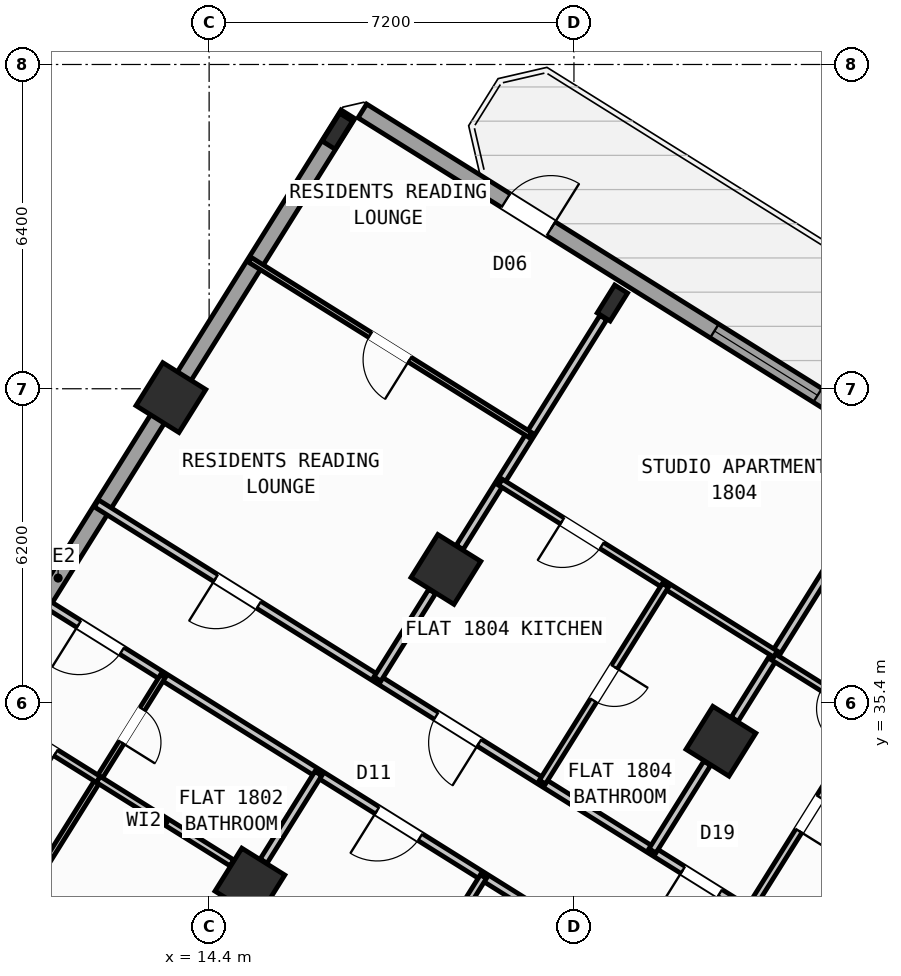
"""IFC4 building model, lengths in metres.
Left out: names, types, materials, properties, quantities, classifications, styles, units other than length and angle.
Written with IfcOpenShell. Run it as: python <this file> out.ifc"""

import sys

from ifc_helpers import new_model, si_unit, direction, frame, frame_2d, origin, origin_2d, place, context, subcontext, project, spatial, rectangle, hollow_rectangle, i_section, extrude, source, transform, mapped, element, fill, save


model = new_model("IFC4")
c1 = context("Model", 3, precision=1e-05, world=origin(), true_north=direction((0.0, 1.0)))
c2 = subcontext(c1, "Body", "Model", "MODEL_VIEW")
j1 = project(units=[si_unit("LENGTHUNIT", "METRE"), si_unit("PLANEANGLEUNIT", "RADIAN")], contexts=[c1])
p1 = place(None, origin())
s1 = spatial("IfcSite", under=j1, at=p1, CompositionType="ELEMENT")
p2 = place(p1, origin())
s2 = spatial("IfcBuilding", under=s1, at=p2, CompositionType="ELEMENT")
p3 = place(p2, frame((0.0, 0.0, 71.7)))
s3 = spatial("IfcBuildingStorey", under=s2, at=p3, CompositionType="ELEMENT", Elevation=71.7)
m1 = source(origin(), c2, "Body", "SweptSolid", [
    extrude(hollow_rectangle(XDim=1.0, YDim=1.0, WallThickness=0.04, at=origin_2d()), origin(), (0.0, 0.0, 1.0), 4.8),
])
p4 = place(p3, frame((24.5, 34.643, 0.0), z_axis=(0.0, 0.0, 1.0), x_axis=(-0.848048096156, 0.529919264233, 0.0)))
e1 = element("IfcColumn", 1, at=p4, inside=s3, PredefinedType="COLUMN", context=c2, shape_type="MappedRepresentation", body=[
    mapped(m1, transform((0.0, 0.0, 0.0), scale=1.0)),
])
m2 = source(origin(), c2, "Body", "SweptSolid", [
    extrude(i_section(OverallWidth=0.3, OverallDepth=0.65, WebThickness=0.016, FlangeThickness=0.031, at=origin_2d()), origin(), (0.0, 0.0, 1.0), 4.8),
])
p5 = place(p3, frame((22.358, 43.292, 0.0), z_axis=(0.0, 0.0, 1.0), x_axis=(-0.848048096156, 0.529919264233, 0.0)))
e2 = element("IfcColumn", 2, at=p5, inside=s3, PredefinedType="COLUMN", context=c2, shape_type="MappedRepresentation", body=[
    mapped(m2, transform((0.0, 0.0, 0.0), scale=1.0)),
])
for number, where, z_axis, x_axis in (
    (3, (19.073, 38.034, 0.0), (0.0, 0.0, 1.0), (-0.848, 0.53, 0.0)),
    (4, (15.205, 31.844, 0.0), (0.0, 0.0, 1.0), (-0.848, 0.53, 0.0)),
):
    element("IfcColumn", number, at=place(p3, frame(where, z_axis=z_axis, x_axis=x_axis)), inside=s3, PredefinedType="COLUMN", context=c2, shape_type="MappedRepresentation", body=[
        mapped(m1, transform((0.0, 0.0, 0.0), scale=1.0)),
    ])
p6 = place(p3, frame((16.931, 46.684, 0.0), z_axis=(0.0, 0.0, 1.0), x_axis=(-0.848048096156, 0.529919264233, 0.0)))
e5 = element("IfcColumn", 5, at=p6, inside=s3, PredefinedType="COLUMN", context=c2, shape_type="MappedRepresentation", body=[
    mapped(m2, transform((0.0, 0.0, 0.0), scale=1.0)),
])
p7 = place(p3, frame((13.646, 41.426, 0.0), z_axis=(0.0, 0.0, 1.0), x_axis=(-0.848048096156, 0.529919264233, 0.0)))
e6 = element("IfcColumn", 6, at=p7, inside=s3, PredefinedType="COLUMN", context=c2, shape_type="MappedRepresentation", body=[
    mapped(m1, transform((0.0, 0.0, 0.0), scale=1.0)),
])
p8 = place(p3, frame((5.7, 28.71, 0.0), z_axis=(0.0, 0.0, 1.0), x_axis=(0.529923711467, 0.8480453172, 0.0)))
e7 = element("IfcWall", 7, at=p8, inside=s3, PredefinedType="STANDARD", context=c2, shape_type="SweptSolid", body=[
    extrude(rectangle(XDim=21.587, YDim=0.32, at=frame_2d((10.794, 0.0))), origin(), (0.0, 0.0, 1.0), 3.895),
])
p9 = place(p8, frame((2.844, 0.0, 0.75)))
e8 = element("IfcOpeningElement", 8, at=p9, cuts=e7, PredefinedType="OPENING", context=c2, shape_type="SweptSolid", body=[
    extrude(rectangle(XDim=2.4, YDim=1.6, at=frame_2d((1.2, 0.8))), frame((0.0, 0.17, 0.0), z_axis=(0.0, -1.0, 0.0), x_axis=(1.0, 0.0, 0.0)), (0.0, 0.0, 1.0), 0.34),
])
p10 = place(p3, frame((17.424, 47.083, 0.0), z_axis=(0.0, 0.0, 1.0), x_axis=(0.848049927979, -0.529916332693, 0.0)))
e9 = element("IfcWall", 9, at=p10, inside=s3, PredefinedType="STANDARD", context=c2, shape_type="SweptSolid", body=[
    extrude(rectangle(XDim=29.223, YDim=0.32, at=frame_2d((14.612, 0.0))), origin(), (0.0, 0.0, 1.0), 4.52),
])
p11 = place(p10, frame((3.339, 0.0, 0.0)))
e10 = element("IfcOpeningElement", 10, at=p11, cuts=e9, PredefinedType="OPENING", context=c2, shape_type="SweptSolid", body=[
    extrude(rectangle(XDim=1.05, YDim=2.15, at=frame_2d((0.525, 1.075))), frame((0.0, 0.17, 0.0), z_axis=(0.0, -1.0, 0.0), x_axis=(1.0, 0.0, 0.0)), (0.0, 0.0, 1.0), 0.34),
])
p12 = place(p10, frame((8.194, 0.0, 0.75)))
e11 = element("IfcOpeningElement", 11, at=p12, cuts=e9, PredefinedType="OPENING", context=c2, shape_type="SweptSolid", body=[
    extrude(rectangle(XDim=2.4, YDim=1.6, at=frame_2d((1.2, 0.8))), frame((0.0, 0.17, 0.0), z_axis=(0.0, -1.0, 0.0), x_axis=(1.0, 0.0, 0.0)), (0.0, 0.0, 1.0), 0.34),
])
p13 = place(p10, frame((22.226, 0.0, 0.85)))
e12 = element("IfcOpeningElement", 12, at=p13, cuts=e9, PredefinedType="OPENING", context=c2, shape_type="SweptSolid", body=[
    extrude(rectangle(XDim=1.8, YDim=1.5, at=frame_2d((0.9, 0.75))), frame((0.0, 0.17, 0.0), z_axis=(0.0, -1.0, 0.0), x_axis=(1.0, 0.0, 0.0)), (0.0, 0.0, 1.0), 0.34),
])
p14 = place(p10, frame((26.934, 0.0, 0.95)))
e13 = element("IfcOpeningElement", 13, at=p14, cuts=e9, PredefinedType="OPENING", context=c2, shape_type="SweptSolid", body=[
    extrude(rectangle(XDim=1.2, YDim=1.4, at=frame_2d((0.6, 0.7))), frame((0.0, 0.17, 0.0), z_axis=(0.0, -1.0, 0.0), x_axis=(1.0, 0.0, 0.0)), (0.0, 0.0, 1.0), 0.34),
])
p15 = place(p10, frame((14.636, 0.0, 1.0)))
e14 = element("IfcOpeningElement", 14, at=p15, cuts=e9, PredefinedType="OPENING", context=c2, shape_type="SweptSolid", body=[
    extrude(rectangle(XDim=0.9, YDim=1.25, at=frame_2d((0.45, 0.625))), frame((0.0, 0.17, 0.0), z_axis=(0.0, -1.0, 0.0), x_axis=(1.0, 0.0, 0.0)), (0.0, 0.0, 1.0), 0.34),
])
p16 = place(p3, frame((31.239, 38.274, 0.0), z_axis=(0.0, 0.0, 1.0), x_axis=(-0.529920220799, -0.848047498427, 0.0)))
e15 = element("IfcWall", 15, at=p16, inside=s3, PredefinedType="PARTITIONING", context=c2, shape_type="SweptSolid", body=[
    extrude(rectangle(XDim=9.2, YDim=0.16, at=frame_2d((4.6, 0.0))), origin(), (0.0, 0.0, 1.0), 4.51),
])
p17 = place(p3, frame((26.363, 30.472, 0.0), z_axis=(0.0, 0.0, 1.0), x_axis=(-0.848052408131, 0.529912363569, 0.0)))
e16 = element("IfcWall", 16, at=p17, inside=s3, PredefinedType="PARTITIONING", context=c2, shape_type="SweptSolid", body=[
    extrude(rectangle(XDim=16.73, YDim=0.16, at=frame_2d((8.365, 0.0))), origin(), (0.0, 0.0, 1.0), 4.51),
])
p18 = place(p17, frame((2.22, 0.0, 0.0)))
e17 = element("IfcOpeningElement", 17, at=p18, cuts=e16, PredefinedType="OPENING", context=c2, shape_type="SweptSolid", body=[
    extrude(rectangle(XDim=0.86, YDim=2.05, at=frame_2d((0.43, 1.025))), frame((0.0, 0.09, 0.0), z_axis=(0.0, -1.0, 0.0), x_axis=(1.0, 0.0, 0.0)), (0.0, 0.0, 1.0), 0.18),
])
p19 = place(p17, frame((7.82, 0.0, 0.0)))
e18 = element("IfcOpeningElement", 18, at=p19, cuts=e16, PredefinedType="OPENING", context=c2, shape_type="SweptSolid", body=[
    extrude(rectangle(XDim=1.0, YDim=2.1, at=frame_2d((0.5, 1.05))), frame((0.0, 0.09, 0.0), z_axis=(0.0, -1.0, 0.0), x_axis=(1.0, 0.0, 0.0)), (0.0, 0.0, 1.0), 0.18),
])
p20 = place(p17, frame((12.95, 0.0, 0.0)))
e19 = element("IfcOpeningElement", 19, at=p20, cuts=e16, PredefinedType="OPENING", context=c2, shape_type="SweptSolid", body=[
    extrude(rectangle(XDim=1.0, YDim=2.1, at=frame_2d((0.5, 1.05))), frame((0.0, 0.09, 0.0), z_axis=(0.0, -1.0, 0.0), x_axis=(1.0, 0.0, 0.0)), (0.0, 0.0, 1.0), 0.18),
])
p21 = place(p3, frame((25.198, 28.606, 0.0), z_axis=(0.0, 0.0, 1.0), x_axis=(-0.848052408131, 0.529912363569, 0.0)))
e20 = element("IfcWall", 20, at=p21, inside=s3, PredefinedType="PARTITIONING", context=c2, shape_type="SweptSolid", body=[
    extrude(rectangle(XDim=16.73, YDim=0.16, at=frame_2d((8.365, 0.0))), origin(), (0.0, 0.0, 1.0), 4.51),
])
p22 = place(p21, frame((1.395, 0.0, 0.0)))
e21 = element("IfcOpeningElement", 21, at=p22, cuts=e20, PredefinedType="OPENING", context=c2, shape_type="SweptSolid", body=[
    extrude(rectangle(XDim=1.0, YDim=2.1, at=frame_2d((0.5, 1.05))), frame((0.0, 0.09, 0.0), z_axis=(0.0, -1.0, 0.0), x_axis=(1.0, 0.0, 0.0)), (0.0, 0.0, 1.0), 0.18),
])
p23 = place(p21, frame((7.82, 0.0, 0.0)))
e22 = element("IfcOpeningElement", 22, at=p23, cuts=e20, PredefinedType="OPENING", context=c2, shape_type="SweptSolid", body=[
    extrude(rectangle(XDim=1.0, YDim=2.1, at=frame_2d((0.5, 1.05))), frame((0.0, 0.09, 0.0), z_axis=(0.0, -1.0, 0.0), x_axis=(1.0, 0.0, 0.0)), (0.0, 0.0, 1.0), 0.18),
])
p24 = place(p21, frame((14.76, 0.0, 0.0)))
e23 = element("IfcOpeningElement", 23, at=p24, cuts=e20, PredefinedType="OPENING", context=c2, shape_type="SweptSolid", body=[
    extrude(rectangle(XDim=1.0, YDim=2.1, at=frame_2d((0.5, 1.05))), frame((0.0, 0.09, 0.0), z_axis=(0.0, -1.0, 0.0), x_axis=(1.0, 0.0, 0.0)), (0.0, 0.0, 1.0), 0.18),
])
p25 = place(p3, frame((16.556, 34.006, 0.0), z_axis=(0.0, 0.0, 1.0), x_axis=(-0.529966635742, -0.848018493313, 0.0)))
e24 = element("IfcWall", 24, at=p25, inside=s3, PredefinedType="PARTITIONING", context=c2, shape_type="SweptSolid", body=[
    extrude(rectangle(XDim=2.038, YDim=0.16, at=frame_2d((1.019, 0.0))), origin(), (0.0, 0.0, 1.0), 3.895),
])
p26 = place(p3, frame((19.812, 31.971, 0.0), z_axis=(0.0, 0.0, 1.0), x_axis=(-0.529917480809, -0.848049210561, 0.0)))
e25 = element("IfcWall", 25, at=p26, inside=s3, PredefinedType="PLUMBINGWALL", context=c2, shape_type="SweptSolid", body=[
    extrude(rectangle(XDim=4.58, YDim=0.14, at=frame_2d((2.29, 0.0))), origin(), (0.0, 0.0, 1.0), 4.51),
])
p27 = place(p26, frame((1.9, 0.0, 0.0)))
e26 = element("IfcOpeningElement", 26, at=p27, cuts=e25, PredefinedType="OPENING", context=c2, shape_type="SweptSolid", body=[
    extrude(rectangle(XDim=0.78, YDim=2.05, at=frame_2d((0.39, 1.025))), frame((0.0, 0.08, 0.0), z_axis=(0.0, -1.0, 0.0), x_axis=(1.0, 0.0, 0.0)), (0.0, 0.0, 1.0), 0.16),
])
p28 = place(p3, frame((13.486, 35.924, 0.0), z_axis=(0.0, 0.0, 1.0), x_axis=(-0.529924195719, -0.848045014602, 0.0)))
e27 = element("IfcWall", 27, at=p28, inside=s3, PredefinedType="PARTITIONING", context=c2, shape_type="SweptSolid", body=[
    extrude(rectangle(XDim=10.57, YDim=0.11, at=frame_2d((5.285, 0.0))), origin(), (0.0, 0.0, 1.0), 4.51),
])
p29 = place(p28, frame((0.76, 0.0, 0.0)))
e28 = element("IfcOpeningElement", 28, at=p29, cuts=e27, PredefinedType="OPENING", context=c2, shape_type="SweptSolid", body=[
    extrude(rectangle(XDim=0.78, YDim=2.05, at=frame_2d((0.39, 1.025))), frame((0.0, 0.065, 0.0), z_axis=(0.0, -1.0, 0.0), x_axis=(1.0, 0.0, 0.0)), (0.0, 0.0, 1.0), 0.13),
])
p30 = place(p28, frame((6.025, 0.0, 0.0)))
e29 = element("IfcOpeningElement", 29, at=p30, cuts=e27, PredefinedType="OPENING", context=c2, shape_type="SweptSolid", body=[
    extrude(rectangle(XDim=0.92, YDim=2.08, at=frame_2d((0.46, 1.04))), frame((0.0, 0.065, 0.0), z_axis=(0.0, -1.0, 0.0), x_axis=(1.0, 0.0, 0.0)), (0.0, 0.0, 1.0), 0.13),
])
p31 = place(p3, frame((12.214, 33.889, 0.0), z_axis=(0.0, 0.0, 1.0), x_axis=(-0.848082963347, 0.529863460979, 0.0)))
e30 = element("IfcWall", 30, at=p31, inside=s3, PredefinedType="PLUMBINGWALL", context=c2, shape_type="SweptSolid", body=[
    extrude(rectangle(XDim=2.268, YDim=0.14, at=frame_2d((1.134, 0.0))), origin(), (0.0, 0.0, 1.0), 3.895),
])
p32 = place(p31, frame((0.99, 0.0, 0.0)))
e31 = element("IfcOpeningElement", 31, at=p32, cuts=e30, PredefinedType="OPENING", context=c2, shape_type="SweptSolid", body=[
    extrude(rectangle(XDim=0.92, YDim=2.08, at=frame_2d((0.46, 1.04))), frame((0.0, 0.08, 0.0), z_axis=(0.0, -1.0, 0.0), x_axis=(1.0, 0.0, 0.0)), (0.0, 0.0, 1.0), 0.16),
])
p33 = place(p3, frame((14.85, 32.242, 0.0), z_axis=(0.0, 0.0, 1.0), x_axis=(-0.848051256418, 0.529914206724, 0.0)))
e32 = element("IfcWall", 32, at=p33, inside=s3, PredefinedType="PLUMBINGWALL", context=c2, shape_type="SweptSolid", body=[
    extrude(rectangle(XDim=3.108, YDim=0.14, at=frame_2d((1.554, 0.0))), origin(), (0.0, 0.0, 1.0), 3.895),
])
p34 = place(p3, frame((27.607, 39.615, 0.0), z_axis=(0.0, 0.0, 1.0), x_axis=(-0.529937421401, -0.848036750028, 0.0)))
e33 = element("IfcWall", 33, at=p34, inside=s3, PredefinedType="PARTITIONING", context=c2, shape_type="SweptSolid", body=[
    extrude(rectangle(XDim=5.351, YDim=0.16, at=frame_2d((2.676, 0.0))), origin(), (0.0, 0.0, 1.0), 3.895),
])
p35 = place(p3, frame((24.229, 34.209, 0.0), z_axis=(0.0, 0.0, 1.0), x_axis=(-0.529826648289, -0.84810596199, 0.0)))
e34 = element("IfcWall", 34, at=p35, inside=s3, PredefinedType="PARTITIONING", context=c2, shape_type="SweptSolid", body=[
    extrude(rectangle(XDim=2.038, YDim=0.16, at=frame_2d((1.019, 0.0))), origin(), (0.0, 0.0, 1.0), 3.895),
])
p36 = place(p3, frame((28.753, 34.297, 0.0), z_axis=(0.0, 0.0, 1.0), x_axis=(-0.848059820872, 0.529900500304, 0.0)))
e35 = element("IfcWall", 35, at=p36, inside=s3, PredefinedType="PLUMBINGWALL", context=c2, shape_type="SweptSolid", body=[
    extrude(rectangle(XDim=3.79, YDim=0.14, at=frame_2d((1.895, 0.0))), origin(), (0.0, 0.0, 1.0), 4.51),
])
p37 = place(p36, frame((1.87, 0.0, 0.0)))
e36 = element("IfcOpeningElement", 36, at=p37, cuts=e35, PredefinedType="OPENING", context=c2, shape_type="SweptSolid", body=[
    extrude(rectangle(XDim=0.78, YDim=2.05, at=frame_2d((0.39, 1.025))), frame((0.0, 0.08, 0.0), z_axis=(0.0, -1.0, 0.0), x_axis=(1.0, 0.0, 0.0)), (0.0, 0.0, 1.0), 0.16),
])
p38 = place(p3, frame((27.439, 35.118, 0.0), z_axis=(0.0, 0.0, 1.0), x_axis=(-0.529911350634, -0.84805304107, 0.0)))
e37 = element("IfcWall", 37, at=p38, inside=s3, PredefinedType="PLUMBINGWALL", context=c2, shape_type="SweptSolid", body=[
    extrude(rectangle(XDim=4.51, YDim=0.14, at=frame_2d((2.255, 0.0))), origin(), (0.0, 0.0, 1.0), 4.135),
])
p39 = place(p38, frame((1.865, 0.0, 0.0)))
e38 = element("IfcOpeningElement", 38, at=p39, cuts=e37, PredefinedType="OPENING", context=c2, shape_type="SweptSolid", body=[
    extrude(rectangle(XDim=0.78, YDim=2.05, at=frame_2d((0.39, 1.025))), frame((0.0, 0.08, 0.0), z_axis=(0.0, -1.0, 0.0), x_axis=(1.0, 0.0, 0.0)), (0.0, 0.0, 1.0), 0.16),
])
p40 = place(p3, frame((22.18, 43.006, 0.0), z_axis=(0.0, 0.0, 1.0), x_axis=(-0.529937421401, -0.848036750028, 0.0)))
e39 = element("IfcWall", 39, at=p40, inside=s3, PredefinedType="PARTITIONING", context=c2, shape_type="SweptSolid", body=[
    extrude(rectangle(XDim=5.351, YDim=0.16, at=frame_2d((2.676, 0.0))), origin(), (0.0, 0.0, 1.0), 3.895),
])
p41 = place(p3, frame((18.802, 37.6, 0.0), z_axis=(0.0, 0.0, 1.0), x_axis=(-0.529880479764, -0.848072330149, 0.0)))
e40 = element("IfcWall", 40, at=p41, inside=s3, PredefinedType="PARTITIONING", context=c2, shape_type="SweptSolid", body=[
    extrude(rectangle(XDim=2.038, YDim=0.16, at=frame_2d((1.019, 0.0))), origin(), (0.0, 0.0, 1.0), 3.895),
])
p42 = place(p3, frame((25.576, 36.365, 0.0), z_axis=(0.0, 0.0, 1.0), x_axis=(-0.848056163074, 0.529906354247, 0.0)))
e41 = element("IfcWall", 41, at=p42, inside=s3, PredefinedType="PLUMBINGWALL", context=c2, shape_type="SweptSolid", body=[
    extrude(rectangle(XDim=6.4, YDim=0.14, at=frame_2d((3.2, 0.0))), origin(), (0.0, 0.0, 1.0), 4.51),
])
p43 = place(p42, frame((4.04, 0.0, 0.0)))
e42 = element("IfcOpeningElement", 42, at=p43, cuts=e41, PredefinedType="OPENING", context=c2, shape_type="SweptSolid", body=[
    extrude(rectangle(XDim=0.92, YDim=2.08, at=frame_2d((0.46, 1.04))), frame((0.0, 0.08, 0.0), z_axis=(0.0, -1.0, 0.0), x_axis=(1.0, 0.0, 0.0)), (0.0, 0.0, 1.0), 0.16),
])
p44 = place(p3, frame((23.405, 37.721, 0.0), z_axis=(0.0, 0.0, 1.0), x_axis=(-0.529955816375, -0.848025254748, 0.0)))
e43 = element("IfcWall", 43, at=p44, inside=s3, PredefinedType="PLUMBINGWALL", context=c2, shape_type="SweptSolid", body=[
    extrude(rectangle(XDim=4.58, YDim=0.14, at=frame_2d((2.29, 0.0))), origin(), (0.0, 0.0, 1.0), 4.51),
])
p45 = place(p44, frame((1.9, 0.0, 0.0)))
e44 = element("IfcOpeningElement", 44, at=p45, cuts=e43, PredefinedType="OPENING", context=c2, shape_type="SweptSolid", body=[
    extrude(rectangle(XDim=0.78, YDim=2.05, at=frame_2d((0.39, 1.025))), frame((0.0, 0.08, 0.0), z_axis=(0.0, -1.0, 0.0), x_axis=(1.0, 0.0, 0.0)), (0.0, 0.0, 1.0), 0.16),
])
p46 = place(p3, frame((20.733, 40.69, 0.0), z_axis=(0.0, 0.0, 1.0), x_axis=(-0.848048787466, 0.529918157905, 0.0)))
e45 = element("IfcWall", 45, at=p46, inside=s3, PredefinedType="PARTITIONING", context=c2, shape_type="SweptSolid", body=[
    extrude(rectangle(XDim=6.52, YDim=0.11, at=frame_2d((3.26, 0.0))), origin(), (0.0, 0.0, 1.0), 4.51),
])
p47 = place(p46, frame((2.8, 0.0, 0.0)))
e46 = element("IfcOpeningElement", 46, at=p47, cuts=e45, PredefinedType="OPENING", context=c2, shape_type="SweptSolid", body=[
    extrude(rectangle(XDim=0.92, YDim=2.08, at=frame_2d((0.46, 1.04))), frame((0.0, 0.065, 0.0), z_axis=(0.0, -1.0, 0.0), x_axis=(1.0, 0.0, 0.0)), (0.0, 0.0, 1.0), 0.13),
])
m3 = source(origin(), c2, "Body", "SweptSolid", [
    extrude(rectangle(XDim=1.05, YDim=2.15, at=frame_2d((0.525, 1.075))), frame((0.0, 0.025, 0.0), z_axis=(0.0, -1.0, 0.0), x_axis=(1.0, 0.0, 0.0)), (0.0, 0.0, 1.0), 0.05),
])
p48 = place(p11, origin())
e47 = element("IfcDoor", 47, at=p48, inside=s3, OperationType="SINGLE_SWING_RIGHT", PredefinedType="DOOR", context=c2, shape_type="MappedRepresentation", body=[
    mapped(m3, transform((0.0, 0.0, 0.0), scale=1.0)),
])
fill(e10, e47)
m4 = source(origin(), c2, "Body", "SweptSolid", [
    extrude(rectangle(XDim=2.4, YDim=1.6, at=frame_2d((1.2, 0.8))), frame((0.0, 0.03, 0.0), z_axis=(0.0, -1.0, 0.0), x_axis=(1.0, 0.0, 0.0)), (0.0, 0.0, 1.0), 0.06),
])
p49 = place(p12, origin())
e48 = element("IfcWindow", 48, at=p49, inside=s3, PartitioningType="SINGLE_PANEL", PredefinedType="WINDOW", context=c2, shape_type="MappedRepresentation", body=[
    mapped(m4, transform((0.0, 0.0, 0.0), scale=1.0)),
])
fill(e11, e48)
m5 = source(origin(), c2, "Body", "SweptSolid", [
    extrude(rectangle(XDim=1.0, YDim=2.1, at=frame_2d((0.5, 1.05))), frame((0.0, 0.025, 0.0), z_axis=(0.0, -1.0, 0.0), x_axis=(1.0, 0.0, 0.0)), (0.0, 0.0, 1.0), 0.05),
])
p50 = place(p23, origin())
e49 = element("IfcDoor", 49, at=p50, inside=s3, OperationType="SINGLE_SWING_RIGHT", PredefinedType="DOOR", context=c2, shape_type="MappedRepresentation", body=[
    mapped(m5, transform((0.0, 0.0, 0.0), scale=1.0)),
])
fill(e22, e49)
p51 = place(p24, origin())
e50 = element("IfcDoor", 50, at=p51, inside=s3, OperationType="SINGLE_SWING_RIGHT", PredefinedType="DOOR", context=c2, shape_type="MappedRepresentation", body=[
    mapped(m5, transform((0.0, 0.0, 0.0), scale=1.0)),
])
fill(e23, e50)
m6 = source(origin(), c2, "Body", "SweptSolid", [
    extrude(rectangle(XDim=0.92, YDim=2.08, at=frame_2d((0.46, 1.04))), frame((0.0, 0.025, 0.0), z_axis=(0.0, -1.0, 0.0), x_axis=(1.0, 0.0, 0.0)), (0.0, 0.0, 1.0), 0.05),
])
p52 = place(p32, origin())
e51 = element("IfcDoor", 51, at=p52, inside=s3, OperationType="SINGLE_SWING_LEFT", PredefinedType="DOOR", context=c2, shape_type="MappedRepresentation", body=[
    mapped(m6, transform((0.0, 0.0, 0.0), scale=1.0)),
])
fill(e31, e51)
m7 = source(origin(), c2, "Body", "SweptSolid", [
    extrude(rectangle(XDim=0.78, YDim=2.05, at=frame_2d((0.39, 1.025))), frame((0.0, 0.025, 0.0), z_axis=(0.0, -1.0, 0.0), x_axis=(1.0, 0.0, 0.0)), (0.0, 0.0, 1.0), 0.05),
])
p53 = place(p29, origin())
e52 = element("IfcDoor", 52, at=p53, inside=s3, OperationType="SINGLE_SWING_RIGHT", PredefinedType="DOOR", context=c2, shape_type="MappedRepresentation", body=[
    mapped(m7, transform((0.0, 0.0, 0.0), scale=1.0)),
])
fill(e28, e52)
m8 = source(origin(), c2, "Body", "SweptSolid", [
    extrude(rectangle(XDim=0.86, YDim=2.05, at=frame_2d((0.43, 1.025))), frame((0.0, 0.025, 0.0), z_axis=(0.0, -1.0, 0.0), x_axis=(1.0, 0.0, 0.0)), (0.0, 0.0, 1.0), 0.05),
])
p54 = place(p18, origin())
e53 = element("IfcDoor", 53, at=p54, inside=s3, OperationType="SINGLE_SWING_RIGHT", PredefinedType="DOOR", context=c2, shape_type="MappedRepresentation", body=[
    mapped(m8, transform((0.0, 0.0, 0.0), scale=1.0)),
])
fill(e17, e53)
p55 = place(p39, origin())
e54 = element("IfcDoor", 54, at=p55, inside=s3, OperationType="SINGLE_SWING_RIGHT", PredefinedType="DOOR", context=c2, shape_type="MappedRepresentation", body=[
    mapped(m7, transform((0.0, 0.0, 0.0), scale=1.0)),
])
fill(e38, e54)
p56 = place(p19, origin())
e55 = element("IfcDoor", 55, at=p56, inside=s3, OperationType="SINGLE_SWING_LEFT", PredefinedType="DOOR", context=c2, shape_type="MappedRepresentation", body=[
    mapped(m5, transform((0.0, 0.0, 0.0), scale=1.0)),
])
fill(e18, e55)
p57 = place(p43, origin())
e56 = element("IfcDoor", 56, at=p57, inside=s3, OperationType="SINGLE_SWING_RIGHT", PredefinedType="DOOR", context=c2, shape_type="MappedRepresentation", body=[
    mapped(m6, transform((0.0, 0.0, 0.0), scale=1.0)),
])
fill(e42, e56)
p58 = place(p45, origin())
e57 = element("IfcDoor", 57, at=p58, inside=s3, OperationType="SINGLE_SWING_LEFT", PredefinedType="DOOR", context=c2, shape_type="MappedRepresentation", body=[
    mapped(m7, transform((0.0, 0.0, 0.0), scale=1.0)),
])
fill(e44, e57)
p59 = place(p20, origin())
e58 = element("IfcDoor", 58, at=p59, inside=s3, OperationType="SINGLE_SWING_RIGHT", PredefinedType="DOOR", context=c2, shape_type="MappedRepresentation", body=[
    mapped(m5, transform((0.0, 0.0, 0.0), scale=1.0)),
])
fill(e19, e58)
p60 = place(p47, origin())
e59 = element("IfcDoor", 59, at=p60, inside=s3, OperationType="SINGLE_SWING_LEFT", PredefinedType="DOOR", context=c2, shape_type="MappedRepresentation", body=[
    mapped(m6, transform((0.0, 0.0, 0.0), scale=1.0)),
])
fill(e46, e59)
save(model, sys.argv[1])
